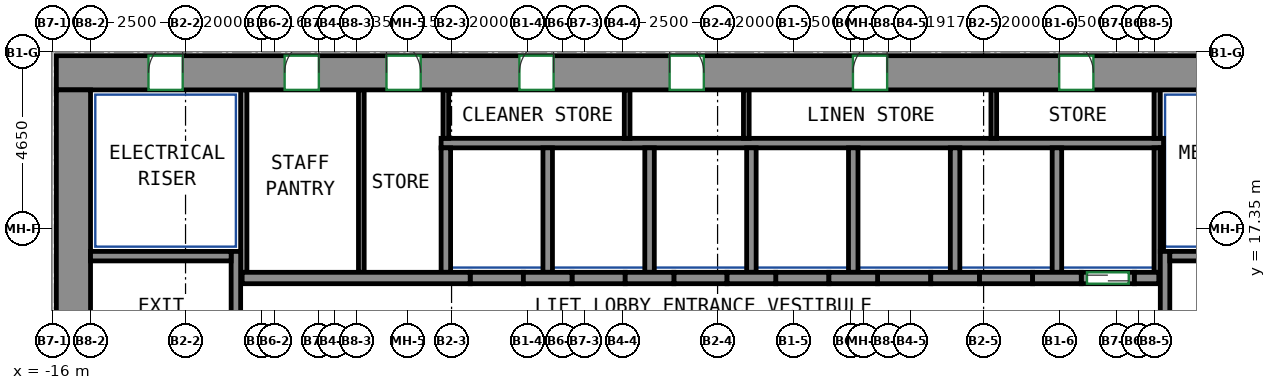
"""IFC4 building model, lengths in metres.
Left out: names, types, materials, properties, quantities, classifications, styles, units other than length and angle.
Written with IfcOpenShell. Run it as: python <this file> out.ifc"""

import sys

from ifc_helpers import new_model, si_unit, direction, frame, frame_2d, origin, place, context, subcontext, project, spatial, rectangle, extrude, source, transform, mapped, element, fill, save


model = new_model("IFC4")
c1 = context("Model", 3, precision=1e-05, world=origin(), true_north=direction((0.0, 1.0)))
c2 = subcontext(c1, "Body", "Model", "MODEL_VIEW")
j1 = project(units=[si_unit("LENGTHUNIT", "METRE"), si_unit("PLANEANGLEUNIT", "RADIAN")], contexts=[c1])
p1 = place(None, origin())
s1 = spatial("IfcSite", under=j1, at=p1, CompositionType="ELEMENT")
p2 = place(p1, origin())
s2 = spatial("IfcBuilding", under=s1, at=p2, CompositionType="ELEMENT")
p3 = place(p2, frame((0.0, 0.0, 124.6)))
s3 = spatial("IfcBuildingStorey", under=s2, at=p3, CompositionType="ELEMENT", Elevation=124.6)
m1 = source(origin(), c2, "Body", "SweptSolid", [
    extrude(rectangle(XDim=33.9, YDim=0.9, at=frame_2d((16.95, 0.0))), origin(), (0.0, 0.0, 1.0), 3.6),
])
p4 = place(p3, frame((-15.9, 21.45, 0.0), z_axis=(0.0, 0.0, 1.0), x_axis=(1.0, 0.0, 0.0)))
e1 = element("IfcWall", 1, at=p4, inside=s3, PredefinedType="SHEAR", context=c2, shape_type="MappedRepresentation", body=[
    mapped(m1, transform((0.0, 0.0, 0.0))),
])
p5 = place(p4, frame((6.008, 0.0, 0.0)))
e2 = element("IfcOpeningElement", 2, at=p5, cuts=e1, PredefinedType="OPENING", context=c2, shape_type="SweptSolid", body=[
    extrude(rectangle(XDim=0.9, YDim=2.1, at=frame_2d((0.45, 1.05))), frame((0.0, 0.46, 0.0), z_axis=(0.0, -1.0, 0.0), x_axis=(1.0, 0.0, 0.0)), (0.0, 0.0, 1.0), 0.92),
])
p6 = place(p4, frame((8.688, 0.0, 0.0)))
e3 = element("IfcOpeningElement", 3, at=p6, cuts=e1, PredefinedType="OPENING", context=c2, shape_type="SweptSolid", body=[
    extrude(rectangle(XDim=0.9, YDim=2.1, at=frame_2d((0.45, 1.05))), frame((0.0, 0.46, 0.0), z_axis=(0.0, -1.0, 0.0), x_axis=(1.0, 0.0, 0.0)), (0.0, 0.0, 1.0), 0.92),
])
p7 = place(p4, frame((12.185, 0.0, 0.0)))
e4 = element("IfcOpeningElement", 4, at=p7, cuts=e1, PredefinedType="OPENING", context=c2, shape_type="SweptSolid", body=[
    extrude(rectangle(XDim=0.9, YDim=2.1, at=frame_2d((0.45, 1.05))), frame((0.0, 0.46, 0.0), z_axis=(0.0, -1.0, 0.0), x_axis=(1.0, 0.0, 0.0)), (0.0, 0.0, 1.0), 0.92),
])
p8 = place(p4, frame((16.138, 0.0, 0.0)))
e5 = element("IfcOpeningElement", 5, at=p8, cuts=e1, PredefinedType="OPENING", context=c2, shape_type="SweptSolid", body=[
    extrude(rectangle(XDim=0.9, YDim=2.1, at=frame_2d((0.45, 1.05))), frame((0.0, 0.46, 0.0), z_axis=(0.0, -1.0, 0.0), x_axis=(1.0, 0.0, 0.0)), (0.0, 0.0, 1.0), 0.92),
])
p9 = place(p4, frame((20.962, 0.0, 0.0)))
e6 = element("IfcOpeningElement", 6, at=p9, cuts=e1, PredefinedType="OPENING", context=c2, shape_type="SweptSolid", body=[
    extrude(rectangle(XDim=0.9, YDim=2.1, at=frame_2d((0.45, 1.05))), frame((0.0, 0.46, 0.0), z_axis=(0.0, -1.0, 0.0), x_axis=(1.0, 0.0, 0.0)), (0.0, 0.0, 1.0), 0.92),
])
p10 = place(p4, frame((26.389, 0.0, 0.0)))
e7 = element("IfcOpeningElement", 7, at=p10, cuts=e1, PredefinedType="OPENING", context=c2, shape_type="SweptSolid", body=[
    extrude(rectangle(XDim=0.9, YDim=2.1, at=frame_2d((0.45, 1.05))), frame((0.0, 0.46, 0.0), z_axis=(0.0, -1.0, 0.0), x_axis=(1.0, 0.0, 0.0)), (0.0, 0.0, 1.0), 0.92),
])
p11 = place(p4, frame((2.425, 0.0, 0.0)))
e8 = element("IfcOpeningElement", 8, at=p11, cuts=e1, PredefinedType="OPENING", context=c2, shape_type="SweptSolid", body=[
    extrude(rectangle(XDim=0.9, YDim=2.1, at=frame_2d((0.45, 1.05))), frame((0.0, 0.46, 0.0), z_axis=(0.0, -1.0, 0.0), x_axis=(1.0, 0.0, 0.0)), (0.0, 0.0, 1.0), 0.92),
])
p12 = place(p4, frame((30.575, 0.0, 0.0)))
e9 = element("IfcOpeningElement", 9, at=p12, cuts=e1, PredefinedType="OPENING", context=c2, shape_type="SweptSolid", body=[
    extrude(rectangle(XDim=0.9, YDim=2.1, at=frame_2d((0.45, 1.05))), frame((0.0, 0.46, 0.0), z_axis=(0.0, -1.0, 0.0), x_axis=(1.0, 0.0, 0.0)), (0.0, 0.0, 1.0), 0.92),
])
m2 = source(origin(), c2, "Body", "SweptSolid", [
    extrude(rectangle(XDim=12.0, YDim=0.9, at=frame_2d((6.0, 0.0))), origin(), (0.0, 0.0, 1.0), 3.6),
])
p13 = place(p3, frame((-15.45, 9.0, 0.0), z_axis=(0.0, 0.0, 1.0), x_axis=(0.0, 1.0, 0.0)))
e10 = element("IfcWall", 10, at=p13, inside=s3, PredefinedType="SHEAR", context=c2, shape_type="MappedRepresentation", body=[
    mapped(m2, transform((0.0, 0.0, 0.0))),
])
m3 = source(origin(), c2, "Body", "SweptSolid", [
    extrude(rectangle(XDim=7.75, YDim=0.25, at=frame_2d((3.875, 0.0))), origin(), (0.0, 0.0, 1.0), 3.6),
])
p14 = place(p3, frame((-11.175, 9.0, 0.0), z_axis=(0.0, 0.0, 1.0), x_axis=(0.0, 1.0, 0.0)))
e11 = element("IfcWall", 11, at=p14, inside=s3, PredefinedType="SHEAR", context=c2, shape_type="MappedRepresentation", body=[
    mapped(m3, transform((0.0, 0.0, 0.0))),
])
m4 = source(origin(), c2, "Body", "SweptSolid", [
    extrude(rectangle(XDim=3.7, YDim=0.25, at=frame_2d((1.85, 0.0))), origin(), (0.0, 0.0, 1.0), 3.6),
])
p15 = place(p3, frame((-15.0, 16.625, 0.0), z_axis=(0.0, 0.0, 1.0), x_axis=(1.0, 0.0, 0.0)))
e12 = element("IfcWall", 12, at=p15, inside=s3, PredefinedType="SHEAR", context=c2, shape_type="MappedRepresentation", body=[
    mapped(m4, transform((0.0, 0.0, 0.0))),
])
p16 = place(p3, frame((13.275, 9.0, 0.0), z_axis=(0.0, 0.0, 1.0), x_axis=(0.0, 1.0, 0.0)))
e13 = element("IfcWall", 13, at=p16, inside=s3, PredefinedType="SHEAR", context=c2, shape_type="MappedRepresentation", body=[
    mapped(m3, transform((0.0, 0.0, 0.0))),
])
m5 = source(origin(), c2, "Body", "SweptSolid", [
    extrude(rectangle(XDim=3.7, YDim=0.25, at=frame_2d((1.85, 0.0))), origin(), (0.0, 0.0, 1.0), 3.6),
])
p17 = place(p3, frame((13.4, 16.625, 0.0), z_axis=(0.0, 0.0, 1.0), x_axis=(1.0, 0.0, 0.0)))
e14 = element("IfcWall", 14, at=p17, inside=s3, PredefinedType="SHEAR", context=c2, shape_type="MappedRepresentation", body=[
    mapped(m5, transform((0.0, 0.0, 0.0))),
])
m6 = source(origin(), c2, "Body", "SweptSolid", [
    extrude(rectangle(XDim=6.0, YDim=0.3, at=frame_2d((3.0, 0.0))), origin(), (0.0, 0.0, 1.0), 3.6),
])
p18 = place(p3, frame((-11.01, 16.05, 0.0), z_axis=(0.0, 0.0, 1.0), x_axis=(1.0, 0.0, 0.0)))
e15 = element("IfcWall", 15, at=p18, inside=s3, PredefinedType="SHEAR", context=c2, shape_type="MappedRepresentation", body=[
    mapped(m6, transform((0.0, 0.0, 0.0))),
])
m7 = source(origin(), c2, "Body", "SweptSolid", [
    extrude(rectangle(XDim=1.28, YDim=0.3, at=frame_2d((0.64, 0.0))), origin(), (0.0, 0.0, 1.0), 3.6),
])
for number, where, z_axis, x_axis in (
    (16, (-3.61, 16.05, 0.0), (0.0, 0.0, 1.0), (1.0, 0.0, 0.0)),
    (17, (-0.93, 16.05, 0.0), (0.0, 0.0, 1.0), (1.0, 0.0, 0.0)),
    (18, (1.75, 16.05, 0.0), (0.0, 0.0, 1.0), (1.0, 0.0, 0.0)),
    (19, (4.43, 16.05, 0.0), (0.0, 0.0, 1.0), (1.0, 0.0, 0.0)),
):
    element("IfcWall", number, at=place(p3, frame(where, z_axis=z_axis, x_axis=x_axis)), inside=s3, PredefinedType="SHEAR", context=c2, shape_type="MappedRepresentation", body=[
        mapped(m7, transform((0.0, 0.0, 0.0))),
    ])
m8 = source(origin(), c2, "Body", "SweptSolid", [
    extrude(rectangle(XDim=1.28, YDim=0.3, at=frame_2d((0.64, 0.0))), origin(), (0.0, 0.0, 1.0), 3.6),
])
p19 = place(p3, frame((7.11, 16.05, 0.0), z_axis=(0.0, 0.0, 1.0), x_axis=(1.0, 0.0, 0.0)))
e20 = element("IfcWall", 20, at=p19, inside=s3, PredefinedType="SHEAR", context=c2, shape_type="MappedRepresentation", body=[
    mapped(m8, transform((0.0, 0.0, 0.0))),
])
p20 = place(p3, frame((9.79, 16.05, 0.0), z_axis=(0.0, 0.0, 1.0), x_axis=(1.0, 0.0, 0.0)))
e21 = element("IfcWall", 21, at=p20, inside=s3, PredefinedType="SHEAR", context=c2, shape_type="MappedRepresentation", body=[
    mapped(m7, transform((0.0, 0.0, 0.0))),
])
m9 = source(origin(), c2, "Body", "SweptSolid", [
    extrude(rectangle(XDim=0.64, YDim=0.3, at=frame_2d((0.32, 0.0))), origin(), (0.0, 0.0, 1.0), 3.6),
])
p21 = place(p3, frame((12.47, 16.05, 0.0), z_axis=(0.0, 0.0, 1.0), x_axis=(1.0, 0.0, 0.0)))
e22 = element("IfcWall", 22, at=p21, inside=s3, PredefinedType="SHEAR", context=c2, shape_type="MappedRepresentation", body=[
    mapped(m9, transform((0.0, 0.0, 0.0))),
])
m10 = source(origin(), c2, "Body", "SweptSolid", [
    extrude(rectangle(XDim=1.4, YDim=0.3, at=frame_2d((0.7, 0.0))), origin(), (0.0, 0.0, 1.0), 3.6),
])
p22 = place(p3, frame((11.07, 16.05, 0.0), z_axis=(0.0, 0.0, 1.0), x_axis=(1.0, 0.0, 0.0)))
e23 = element("IfcWall", 23, at=p22, inside=s3, PredefinedType="PARTITIONING", context=c2, shape_type="MappedRepresentation", body=[
    mapped(m10, transform((0.0, 0.0, 0.0))),
])
p23 = place(p22, frame((0.15, 0.0, 0.0)))
e24 = element("IfcOpeningElement", 24, at=p23, cuts=e23, PredefinedType="OPENING", context=c2, shape_type="SweptSolid", body=[
    extrude(rectangle(XDim=1.1, YDim=2.1, at=frame_2d((0.55, 1.05))), frame((0.0, 0.16, 0.0), z_axis=(0.0, -1.0, 0.0), x_axis=(1.0, 0.0, 0.0)), (0.0, 0.0, 1.0), 0.32),
])
p24 = place(p3, frame((-5.01, 16.05, 0.0), z_axis=(0.0, 0.0, 1.0), x_axis=(1.0, 0.0, 0.0)))
e25 = element("IfcWall", 25, at=p24, inside=s3, PredefinedType="PARTITIONING", context=c2, shape_type="MappedRepresentation", body=[
    mapped(m10, transform((0.0, 0.0, 0.0))),
])
m11 = source(origin(), c2, "Body", "SweptSolid", [
    extrude(rectangle(XDim=1.4, YDim=0.3, at=frame_2d((0.7, 0.0))), origin(), (0.0, 0.0, 1.0), 3.6),
])
p25 = place(p3, frame((-2.33, 16.05, 0.0), z_axis=(0.0, 0.0, 1.0), x_axis=(1.0, 0.0, 0.0)))
e26 = element("IfcWall", 26, at=p25, inside=s3, PredefinedType="PARTITIONING", context=c2, shape_type="MappedRepresentation", body=[
    mapped(m11, transform((0.0, 0.0, 0.0))),
])
for number, where, z_axis, x_axis in (
    (27, (0.35, 16.05, 0.0), (0.0, 0.0, 1.0), (1.0, 0.0, 0.0)),
    (28, (3.03, 16.05, 0.0), (0.0, 0.0, 1.0), (1.0, 0.0, 0.0)),
):
    element("IfcWall", number, at=place(p3, frame(where, z_axis=z_axis, x_axis=x_axis)), inside=s3, PredefinedType="PARTITIONING", context=c2, shape_type="MappedRepresentation", body=[
        mapped(m10, transform((0.0, 0.0, 0.0))),
    ])
for number, where, z_axis, x_axis in (
    (29, (5.71, 16.05, 0.0), (0.0, 0.0, 1.0), (1.0, 0.0, 0.0)),
    (30, (8.39, 16.05, 0.0), (0.0, 0.0, 1.0), (1.0, 0.0, 0.0)),
):
    element("IfcWall", number, at=place(p3, frame(where, z_axis=z_axis, x_axis=x_axis)), inside=s3, PredefinedType="PARTITIONING", context=c2, shape_type="MappedRepresentation", body=[
        mapped(m11, transform((0.0, 0.0, 0.0))),
    ])
m12 = source(origin(), c2, "Body", "SweptSolid", [
    extrude(rectangle(XDim=19.01, YDim=0.25, at=frame_2d((9.505, 0.0))), origin(), (0.0, 0.0, 1.0), 3.6),
])
p26 = place(p3, frame((-5.775, 19.6, 0.0), z_axis=(0.0, 0.0, 1.0), x_axis=(1.0, 0.0, 0.0)))
e31 = element("IfcWall", 31, at=p26, inside=s3, PredefinedType="PARTITIONING", context=c2, shape_type="MappedRepresentation", body=[
    mapped(m12, transform((0.0, 0.0, 0.0))),
])
m13 = source(origin(), c2, "Body", "SweptSolid", [
    extrude(rectangle(XDim=3.275, YDim=0.165, at=frame_2d((1.638, 0.0))), origin(), (0.0, 0.0, 1.0), 3.6),
])
p27 = place(p3, frame((13.067, 16.2, 0.0), z_axis=(0.0, 0.0, 1.0), x_axis=(0.0, 1.0, 0.0)))
e32 = element("IfcWall", 32, at=p27, inside=s3, PredefinedType="PARTITIONING", context=c2, shape_type="MappedRepresentation", body=[
    mapped(m13, transform((0.0, 0.0, 0.0))),
])
m14 = source(origin(), c2, "Body", "SweptSolid", [
    extrude(rectangle(XDim=1.275, YDim=0.165, at=frame_2d((0.637, 0.0))), origin(), (0.0, 0.0, 1.0), 3.6),
])
p28 = place(p3, frame((13.067, 19.725, 0.0), z_axis=(0.0, 0.0, 1.0), x_axis=(0.0, 1.0, 0.0)))
e33 = element("IfcWall", 33, at=p28, inside=s3, PredefinedType="PARTITIONING", context=c2, shape_type="MappedRepresentation", body=[
    mapped(m14, transform((0.0, 0.0, 0.0))),
])
m15 = source(origin(), c2, "Body", "SweptSolid", [
    extrude(rectangle(XDim=4.8, YDim=0.165, at=frame_2d((2.4, 0.0))), origin(), (0.0, 0.0, 1.0), 3.6),
])
p29 = place(p3, frame((-10.968, 16.2, 0.0), z_axis=(0.0, 0.0, 1.0), x_axis=(0.0, 1.0, 0.0)))
e34 = element("IfcWall", 34, at=p29, inside=s3, PredefinedType="PARTITIONING", context=c2, shape_type="MappedRepresentation", body=[
    mapped(m15, transform((0.0, 0.0, 0.0))),
])
m16 = source(origin(), c2, "Body", "SweptSolid", [
    extrude(rectangle(XDim=3.275, YDim=0.25, at=frame_2d((1.638, 0.0))), origin(), (0.0, 0.0, 1.0), 3.6),
])
p30 = place(p3, frame((10.43, 16.2, 0.0), z_axis=(0.0, 0.0, 1.0), x_axis=(0.0, 1.0, 0.0)))
e35 = element("IfcWall", 35, at=p30, inside=s3, PredefinedType="PARTITIONING", context=c2, shape_type="MappedRepresentation", body=[
    mapped(m16, transform((0.0, 0.0, 0.0))),
])
m17 = source(origin(), c2, "Body", "SweptSolid", [
    extrude(rectangle(XDim=2.725, YDim=0.085, at=frame_2d((1.363, 0.0))), origin(), (0.0, 0.0, 1.0), 3.6),
])
p31 = place(p3, frame((13.192, 16.75, 0.0), z_axis=(0.0, 0.0, 1.0), x_axis=(0.0, 1.0, 0.0)))
e36 = element("IfcWall", 36, at=p31, inside=s3, PredefinedType="PARTITIONING", context=c2, shape_type="MappedRepresentation", body=[
    mapped(m17, transform((0.0, 0.0, 0.0))),
])
for number, where, z_axis, x_axis in (
    (37, (2.39, 16.2, 0.0), (0.0, 0.0, 1.0), (0.0, 1.0, 0.0)),
    (38, (5.07, 16.2, 0.0), (0.0, 0.0, 1.0), (0.0, 1.0, 0.0)),
    (39, (7.75, 16.2, 0.0), (0.0, 0.0, 1.0), (0.0, 1.0, 0.0)),
    (40, (-0.29, 16.2, 0.0), (0.0, 0.0, 1.0), (0.0, 1.0, 0.0)),
    (41, (-2.97, 16.2, 0.0), (0.0, 0.0, 1.0), (0.0, 1.0, 0.0)),
    (42, (-5.65, 16.2, 0.0), (0.0, 0.0, 1.0), (0.0, 1.0, 0.0)),
):
    element("IfcWall", number, at=place(p3, frame(where, z_axis=z_axis, x_axis=x_axis)), inside=s3, PredefinedType="PARTITIONING", context=c2, shape_type="MappedRepresentation", body=[
        mapped(m16, transform((0.0, 0.0, 0.0))),
    ])
m18 = source(origin(), c2, "Body", "SweptSolid", [
    extrude(rectangle(XDim=4.8, YDim=0.15, at=frame_2d((2.4, 0.0))), origin(), (0.0, 0.0, 1.0), 3.6),
])
p32 = place(p3, frame((-7.875, 16.2, 0.0), z_axis=(0.0, 0.0, 1.0), x_axis=(0.0, 1.0, 0.0)))
e43 = element("IfcWall", 43, at=p32, inside=s3, PredefinedType="PARTITIONING", context=c2, shape_type="MappedRepresentation", body=[
    mapped(m18, transform((0.0, 0.0, 0.0))),
])
m19 = source(origin(), c2, "Body", "SweptSolid", [
    extrude(rectangle(XDim=1.275, YDim=0.15, at=frame_2d((0.637, 0.0))), origin(), (0.0, 0.0, 1.0), 3.6),
])
for number, where, z_axis, x_axis in (
    (44, (-5.65, 19.725, 0.0), (0.0, 0.0, 1.0), (0.0, 1.0, 0.0)),
    (45, (-0.88, 19.725, 0.0), (0.0, 0.0, 1.0), (0.0, 1.0, 0.0)),
    (46, (2.256, 19.725, 0.0), (0.0, 0.0, 1.0), (0.0, 1.0, 0.0)),
    (47, (8.768, 19.725, 0.0), (0.0, 0.0, 1.0), (0.0, 1.0, 0.0)),
):
    element("IfcWall", number, at=place(p3, frame(where, z_axis=z_axis, x_axis=x_axis)), inside=s3, PredefinedType="PARTITIONING", context=c2, shape_type="MappedRepresentation", body=[
        mapped(m19, transform((0.0, 0.0, 0.0))),
    ])
p33 = place(p23, origin())
e48 = element("IfcDoor", 48, at=p33, inside=s3, OperationType="DOUBLE_DOOR_SLIDING", PredefinedType="DOOR", context=c2, shape_type="SweptSolid", body=[
    extrude(rectangle(XDim=1.1, YDim=2.1, at=frame_2d((0.55, 1.05))), frame((0.0, 0.025, 0.0), z_axis=(0.0, -1.0, 0.0), x_axis=(1.0, 0.0, 0.0)), (0.0, 0.0, 1.0), 0.05),
])
fill(e24, e48)
p34 = place(p5, origin())
e49 = element("IfcDoor", 49, at=p34, inside=s3, OperationType="SINGLE_SWING_RIGHT", PredefinedType="DOOR", context=c2, shape_type="SweptSolid", body=[
    extrude(rectangle(XDim=0.9, YDim=2.1, at=frame_2d((0.45, 1.05))), frame((0.0, -0.305, 0.0), z_axis=(0.0, -1.0, 0.0), x_axis=(1.0, 0.0, 0.0)), (0.0, 0.0, 1.0), 0.05),
])
fill(e2, e49)
p35 = place(p6, origin())
e50 = element("IfcDoor", 50, at=p35, inside=s3, OperationType="SINGLE_SWING_LEFT", PredefinedType="DOOR", context=c2, shape_type="SweptSolid", body=[
    extrude(rectangle(XDim=0.9, YDim=2.1, at=frame_2d((0.45, 1.05))), frame((0.0, -0.305, 0.0), z_axis=(0.0, -1.0, 0.0), x_axis=(1.0, 0.0, 0.0)), (0.0, 0.0, 1.0), 0.05),
])
fill(e3, e50)
p36 = place(p7, origin())
e51 = element("IfcDoor", 51, at=p36, inside=s3, OperationType="SINGLE_SWING_RIGHT", PredefinedType="DOOR", context=c2, shape_type="SweptSolid", body=[
    extrude(rectangle(XDim=0.9, YDim=2.1, at=frame_2d((0.45, 1.05))), frame((0.0, -0.305, 0.0), z_axis=(0.0, -1.0, 0.0), x_axis=(1.0, 0.0, 0.0)), (0.0, 0.0, 1.0), 0.05),
])
fill(e4, e51)
p37 = place(p8, origin())
e52 = element("IfcDoor", 52, at=p37, inside=s3, OperationType="SINGLE_SWING_LEFT", PredefinedType="DOOR", context=c2, shape_type="SweptSolid", body=[
    extrude(rectangle(XDim=0.9, YDim=2.1, at=frame_2d((0.45, 1.05))), frame((0.0, -0.305, 0.0), z_axis=(0.0, -1.0, 0.0), x_axis=(1.0, 0.0, 0.0)), (0.0, 0.0, 1.0), 0.05),
])
fill(e5, e52)
p38 = place(p9, origin())
e53 = element("IfcDoor", 53, at=p38, inside=s3, OperationType="SINGLE_SWING_RIGHT", PredefinedType="DOOR", context=c2, shape_type="SweptSolid", body=[
    extrude(rectangle(XDim=0.9, YDim=2.1, at=frame_2d((0.45, 1.05))), frame((0.0, -0.305, 0.0), z_axis=(0.0, -1.0, 0.0), x_axis=(1.0, 0.0, 0.0)), (0.0, 0.0, 1.0), 0.05),
])
fill(e6, e53)
p39 = place(p10, origin())
e54 = element("IfcDoor", 54, at=p39, inside=s3, OperationType="SINGLE_SWING_LEFT", PredefinedType="DOOR", context=c2, shape_type="SweptSolid", body=[
    extrude(rectangle(XDim=0.9, YDim=2.1, at=frame_2d((0.45, 1.05))), frame((0.0, -0.305, 0.0), z_axis=(0.0, -1.0, 0.0), x_axis=(1.0, 0.0, 0.0)), (0.0, 0.0, 1.0), 0.05),
])
fill(e7, e54)
p40 = place(p11, origin())
e55 = element("IfcDoor", 55, at=p40, inside=s3, OperationType="SINGLE_SWING_RIGHT", PredefinedType="DOOR", context=c2, shape_type="SweptSolid", body=[
    extrude(rectangle(XDim=0.9, YDim=2.1, at=frame_2d((0.45, 1.05))), frame((0.0, -0.305, 0.0), z_axis=(0.0, -1.0, 0.0), x_axis=(1.0, 0.0, 0.0)), (0.0, 0.0, 1.0), 0.05),
])
fill(e8, e55)
save(model, sys.argv[1])
